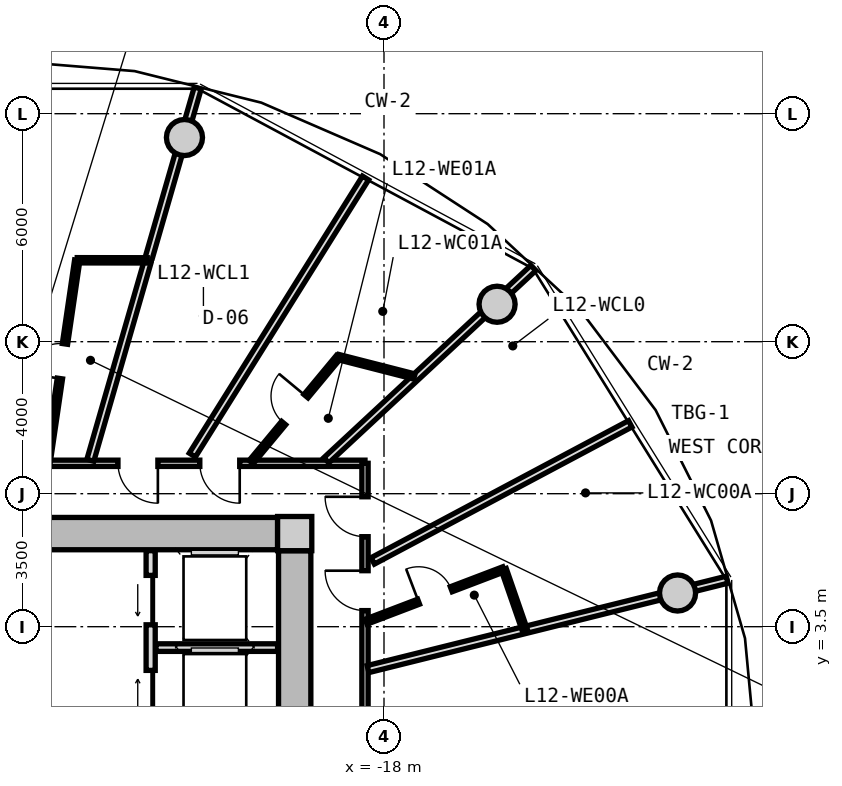
"""IFC4 building model, lengths in metres.
Left out: names, types, materials, properties, quantities, classifications, styles, units other than length and angle.
Written with IfcOpenShell. Run it as: python <this file> out.ifc"""

import sys

from ifc_helpers import new_model, si_unit, direction, frame, frame_2d, origin, origin_2d, place, context, subcontext, project, spatial, rectangle, circle, extrude, source, transform, mapped, element, fill, save


model = new_model("IFC4")
c1 = context("Model", 3, precision=1e-05, world=origin(), true_north=direction((0.0, 1.0)))
c2 = subcontext(c1, "Body", "Model", "MODEL_VIEW")
j1 = project(units=[si_unit("LENGTHUNIT", "METRE"), si_unit("PLANEANGLEUNIT", "RADIAN")], contexts=[c1])
p1 = place(None, origin())
s1 = spatial("IfcSite", under=j1, at=p1, CompositionType="ELEMENT")
p2 = place(p1, origin())
s2 = spatial("IfcBuilding", under=s1, at=p2, CompositionType="ELEMENT")
p3 = place(p2, frame((0.0, 0.0, 42.95)))
s3 = spatial("IfcBuildingStorey", under=s2, at=p3, CompositionType="ELEMENT", Elevation=42.95)
m1 = source(origin(), c2, "Body", "SweptSolid", [
    extrude(rectangle(XDim=0.9, YDim=0.9, at=origin_2d()), origin(), (0.0, 0.0, 1.0), 3.05),
])
p4 = place(p3, frame((-20.35, 5.95, 0.0), z_axis=(0.0, 0.0, 1.0), x_axis=(1.0, 0.0, 0.0)))
e1 = element("IfcColumn", 1, at=p4, inside=s3, PredefinedType="COLUMN", context=c2, shape_type="MappedRepresentation", body=[
    mapped(m1, transform((0.0, 0.0, 0.0), x_axis=(1.0, 0.0, 0.0), y_axis=(0.0, 1.0, 0.0), z_axis=(0.0, 0.0, 1.0), scale=1.0)),
])
m2 = source(origin(), c2, "Body", "SweptSolid", [
    extrude(rectangle(XDim=14.4, YDim=0.85, at=frame_2d((7.2, 0.0))), origin(), (0.0, 0.0, 1.0), 2.79),
])
p5 = place(p3, frame((-35.2, 5.95, 0.0), z_axis=(0.0, 0.0, 1.0), x_axis=(1.0, 0.0, 0.0)))
e2 = element("IfcWall", 2, at=p5, inside=s3, PredefinedType="SHEAR", context=c2, shape_type="MappedRepresentation", body=[
    mapped(m2, transform((0.0, 0.0, 0.0), x_axis=(1.0, 0.0, 0.0), y_axis=(0.0, 1.0, 0.0), z_axis=(0.0, 0.0, 1.0), scale=1.0)),
])
m3 = source(origin(), c2, "Body", "SweptSolid", [
    extrude(rectangle(XDim=11.0, YDim=0.85, at=frame_2d((5.5, 0.0))), origin(), (0.0, 0.0, 1.0), 2.79),
])
p6 = place(p3, frame((-20.35, 5.5, 0.0), z_axis=(0.0, 0.0, 1.0), x_axis=(0.0, -1.0, 0.0)))
e3 = element("IfcWall", 3, at=p6, inside=s3, PredefinedType="SHEAR", context=c2, shape_type="MappedRepresentation", body=[
    mapped(m3, transform((0.0, 0.0, 0.0), x_axis=(1.0, 0.0, 0.0), y_axis=(0.0, 1.0, 0.0), z_axis=(0.0, 0.0, 1.0), scale=1.0)),
])
p7 = place(p6, frame((5.65, 0.0, 0.0)))
e4 = element("IfcOpeningElement", 4, at=p7, cuts=e3, PredefinedType="OPENING", context=c2, shape_type="SweptSolid", body=[
    extrude(rectangle(XDim=1.2, YDim=2.15, at=frame_2d((0.6, 1.075))), frame((0.0, 0.435, 0.0), z_axis=(0.0, -1.0, 0.0), x_axis=(1.0, 0.0, 0.0)), (0.0, 0.0, 1.0), 0.87),
])
m4 = source(origin(), c2, "Body", "SweptSolid", [
    extrude(circle(Radius=0.475, at=origin_2d()), origin(), (0.0, 0.0, 1.0), 3.05),
])
for number, where, z_axis, x_axis in (
    (5, (-10.275, 4.387, 0.0), (0.0, 0.0, 1.0), (1.0, 0.0, 0.0)),
    (6, (-15.025, 11.985, 0.0), (0.0, 0.0, 1.0), (1.0, 0.0, 0.0)),
    (7, (-23.251, 16.373, 0.0), (0.0, 0.0, 1.0), (1.0, 0.0, 0.0)),
):
    element("IfcColumn", number, at=place(p3, frame(where, z_axis=z_axis, x_axis=x_axis)), inside=s3, PredefinedType="COLUMN", context=c2, shape_type="MappedRepresentation", body=[
        mapped(m4, transform((0.0, 0.0, 0.0), x_axis=(1.0, 0.0, 0.0), y_axis=(0.0, 1.0, 0.0), z_axis=(0.0, 0.0, 1.0), scale=1.0)),
    ])
m5 = source(origin(), c2, "Body", "SweptSolid", [
    extrude(rectangle(XDim=5.0, YDim=0.24, at=frame_2d((2.5, 0.0))), origin(), (0.0, 0.0, 1.0), 2.775),
])
p8 = place(p3, frame((-24.14, 0.5, 0.0), z_axis=(0.0, 0.0, 1.0), x_axis=(0.0, 1.0, 0.0)))
e8 = element("IfcWall", 8, at=p8, inside=s3, PredefinedType="PARTITIONING", context=c2, shape_type="MappedRepresentation", body=[
    mapped(m5, transform((0.0, 0.0, 0.0), x_axis=(1.0, 0.0, 0.0), y_axis=(0.0, 1.0, 0.0), z_axis=(0.0, 0.0, 1.0), scale=1.0)),
])
p9 = place(p8, frame((3.05, 0.0, 0.0)))
e9 = element("IfcOpeningElement", 9, at=p9, cuts=e8, PredefinedType="OPENING", context=c2, shape_type="SweptSolid", body=[
    extrude(rectangle(XDim=1.3, YDim=2.2, at=frame_2d((0.65, 1.1))), frame((0.0, 0.13, 0.0), z_axis=(0.0, -1.0, 0.0), x_axis=(1.0, 0.0, 0.0)), (0.0, 0.0, 1.0), 0.26),
])
p10 = place(p8, frame((0.55, 0.0, 0.0)))
e10 = element("IfcOpeningElement", 10, at=p10, cuts=e8, PredefinedType="OPENING", context=c2, shape_type="SweptSolid", body=[
    extrude(rectangle(XDim=1.3, YDim=2.2, at=frame_2d((0.65, 1.1))), frame((0.0, 0.13, 0.0), z_axis=(0.0, -1.0, 0.0), x_axis=(1.0, 0.0, 0.0)), (0.0, 0.0, 1.0), 0.26),
])
m6 = source(origin(), c2, "Body", "SweptSolid", [
    extrude(rectangle(XDim=3.2, YDim=0.2, at=frame_2d((1.6, 0.0))), origin(), (0.0, 0.0, 1.0), 2.775),
])
p11 = place(p3, frame((-24.0, 2.95, 0.0), z_axis=(0.0, 0.0, 1.0), x_axis=(1.0, 0.0, 0.0)))
e11 = element("IfcWall", 11, at=p11, inside=s3, PredefinedType="PARTITIONING", context=c2, shape_type="MappedRepresentation", body=[
    mapped(m6, transform((0.0, 0.0, 0.0), x_axis=(1.0, 0.0, 0.0), y_axis=(0.0, 1.0, 0.0), z_axis=(0.0, 0.0, 1.0), scale=1.0)),
])
m7 = source(origin(), c2, "Body", "SweptSolid", [
    extrude(rectangle(XDim=19.0, YDim=0.165, at=frame_2d((9.5, 0.0))), origin(), (0.0, 0.0, 1.0), 2.775),
])
p12 = place(p3, frame((-37.5, 7.8, 0.0), z_axis=(0.0, 0.0, 1.0), x_axis=(1.0, 0.0, 0.0)))
e12 = element("IfcWall", 12, at=p12, inside=s3, PredefinedType="PARTITIONING", context=c2, shape_type="MappedRepresentation", body=[
    mapped(m7, transform((0.0, 0.0, 0.0), x_axis=(1.0, 0.0, 0.0), y_axis=(0.0, 1.0, 0.0), z_axis=(0.0, 0.0, 1.0), scale=1.0)),
])
p13 = place(p12, frame((4.773, 0.0, 0.0)))
e13 = element("IfcOpeningElement", 13, at=p13, cuts=e12, PredefinedType="OPENING", context=c2, shape_type="SweptSolid", body=[
    extrude(rectangle(XDim=1.05, YDim=2.15, at=frame_2d((0.525, 1.075))), frame((0.0, 0.093, 0.0), z_axis=(0.0, -1.0, 0.0), x_axis=(1.0, 0.0, 0.0)), (0.0, 0.0, 1.0), 0.185),
])
p14 = place(p12, frame((2.251, 0.0, 0.0)))
e14 = element("IfcOpeningElement", 14, at=p14, cuts=e12, PredefinedType="OPENING", context=c2, shape_type="SweptSolid", body=[
    extrude(rectangle(XDim=1.05, YDim=2.15, at=frame_2d((0.525, 1.075))), frame((0.0, 0.093, 0.0), z_axis=(0.0, -1.0, 0.0), x_axis=(1.0, 0.0, 0.0)), (0.0, 0.0, 1.0), 0.185),
])
p15 = place(p12, frame((14.653, 0.0, 0.0)))
e15 = element("IfcOpeningElement", 15, at=p15, cuts=e12, PredefinedType="OPENING", context=c2, shape_type="SweptSolid", body=[
    extrude(rectangle(XDim=1.05, YDim=2.15, at=frame_2d((0.525, 1.075))), frame((0.0, 0.093, 0.0), z_axis=(0.0, -1.0, 0.0), x_axis=(1.0, 0.0, 0.0)), (0.0, 0.0, 1.0), 0.185),
])
p16 = place(p12, frame((12.5, 0.0, 0.0)))
e16 = element("IfcOpeningElement", 16, at=p16, cuts=e12, PredefinedType="OPENING", context=c2, shape_type="SweptSolid", body=[
    extrude(rectangle(XDim=1.05, YDim=2.15, at=frame_2d((0.525, 1.075))), frame((0.0, 0.093, 0.0), z_axis=(0.0, -1.0, 0.0), x_axis=(1.0, 0.0, 0.0)), (0.0, 0.0, 1.0), 0.185),
])
p17 = place(p12, frame((9.352, 0.0, 0.0)))
e17 = element("IfcOpeningElement", 17, at=p17, cuts=e12, PredefinedType="OPENING", context=c2, shape_type="SweptSolid", body=[
    extrude(rectangle(XDim=1.05, YDim=2.15, at=frame_2d((0.525, 1.075))), frame((0.0, 0.093, 0.0), z_axis=(0.0, -1.0, 0.0), x_axis=(1.0, 0.0, 0.0)), (0.0, 0.0, 1.0), 0.185),
])
p18 = place(p12, frame((7.806, 0.0, 0.0)))
e18 = element("IfcOpeningElement", 18, at=p18, cuts=e12, PredefinedType="OPENING", context=c2, shape_type="SweptSolid", body=[
    extrude(rectangle(XDim=1.05, YDim=2.15, at=frame_2d((0.525, 1.075))), frame((0.0, 0.093, 0.0), z_axis=(0.0, -1.0, 0.0), x_axis=(1.0, 0.0, 0.0)), (0.0, 0.0, 1.0), 0.185),
])
m8 = source(origin(), c2, "Body", "SweptSolid", [
    extrude(rectangle(XDim=15.6, YDim=0.165, at=frame_2d((7.8, 0.0))), origin(), (0.0, 0.0, 1.0), 2.775),
])
p19 = place(p3, frame((-18.5, 7.8, 0.0), z_axis=(0.0, 0.0, 1.0), x_axis=(0.0, -1.0, 0.0)))
e19 = element("IfcWall", 19, at=p19, inside=s3, PredefinedType="PARTITIONING", context=c2, shape_type="MappedRepresentation", body=[
    mapped(m8, transform((0.0, 0.0, 0.0), x_axis=(1.0, 0.0, 0.0), y_axis=(0.0, 1.0, 0.0), z_axis=(0.0, 0.0, 1.0), scale=1.0)),
])
p20 = place(p19, frame((12.141, 0.0, 0.0)))
e20 = element("IfcOpeningElement", 20, at=p20, cuts=e19, PredefinedType="OPENING", context=c2, shape_type="SweptSolid", body=[
    extrude(rectangle(XDim=1.25, YDim=2.2, at=frame_2d((0.625, 1.1))), frame((0.0, 0.093, 0.0), z_axis=(0.0, -1.0, 0.0), x_axis=(1.0, 0.0, 0.0)), (0.0, 0.0, 1.0), 0.185),
])
p21 = place(p19, frame((7.175, 0.0, 0.0)))
e21 = element("IfcOpeningElement", 21, at=p21, cuts=e19, PredefinedType="OPENING", context=c2, shape_type="SweptSolid", body=[
    extrude(rectangle(XDim=1.25, YDim=2.2, at=frame_2d((0.625, 1.1))), frame((0.0, 0.093, 0.0), z_axis=(0.0, -1.0, 0.0), x_axis=(1.0, 0.0, 0.0)), (0.0, 0.0, 1.0), 0.185),
])
p22 = place(p19, frame((2.826, 0.0, 0.0)))
e22 = element("IfcOpeningElement", 22, at=p22, cuts=e19, PredefinedType="OPENING", context=c2, shape_type="SweptSolid", body=[
    extrude(rectangle(XDim=1.05, YDim=2.15, at=frame_2d((0.525, 1.075))), frame((0.0, 0.093, 0.0), z_axis=(0.0, -1.0, 0.0), x_axis=(1.0, 0.0, 0.0)), (0.0, 0.0, 1.0), 0.185),
])
p23 = place(p19, frame((0.881, 0.0, 0.0)))
e23 = element("IfcOpeningElement", 23, at=p23, cuts=e19, PredefinedType="OPENING", context=c2, shape_type="SweptSolid", body=[
    extrude(rectangle(XDim=1.05, YDim=2.15, at=frame_2d((0.525, 1.075))), frame((0.0, 0.093, 0.0), z_axis=(0.0, -1.0, 0.0), x_axis=(1.0, 0.0, 0.0)), (0.0, 0.0, 1.0), 0.185),
])
m9 = source(origin(), c2, "Body", "SweptSolid", [
    extrude(rectangle(XDim=9.737, YDim=0.19, at=frame_2d((4.869, 0.0))), origin(), (0.0, 0.0, 1.0), 2.225),
])
p24 = place(p3, frame((-18.42, 2.385, 0.0), z_axis=(0.0, 0.0, 1.0), x_axis=(0.970392716238, 0.241532557375, 0.0)))
e24 = element("IfcWall", 24, at=p24, inside=s3, PredefinedType="PARTITIONING", context=c2, shape_type="MappedRepresentation", body=[
    mapped(m9, transform((0.0, 0.0, 0.0), x_axis=(1.0, 0.0, 0.0), y_axis=(0.0, 1.0, 0.0), z_axis=(0.0, 0.0, 1.0), scale=1.0)),
])
m10 = source(origin(), c2, "Body", "SweptSolid", [
    extrude(rectangle(XDim=7.435, YDim=0.19, at=frame_2d((3.717, 0.0))), origin(), (0.0, 0.0, 1.0), 2.225),
])
p25 = place(p3, frame((-19.517, 7.88, 0.0), z_axis=(0.0, 0.0, 1.0), x_axis=(0.732651956848, 0.680603489652, 0.0)))
e25 = element("IfcWall", 25, at=p25, inside=s3, PredefinedType="PARTITIONING", context=c2, shape_type="MappedRepresentation", body=[
    mapped(m10, transform((0.0, 0.0, 0.0), x_axis=(1.0, 0.0, 0.0), y_axis=(0.0, 1.0, 0.0), z_axis=(0.0, 0.0, 1.0), scale=1.0)),
])
m11 = source(origin(), c2, "Body", "SweptSolid", [
    extrude(rectangle(XDim=7.677, YDim=0.19, at=frame_2d((3.838, 0.0))), origin(), (0.0, 0.0, 1.0), 2.775),
])
p26 = place(p3, frame((-18.297, 5.231, 0.0), z_axis=(0.0, 0.0, 1.0), x_axis=(0.882725057546, 0.469889851753, 0.0)))
e26 = element("IfcWall", 26, at=p26, inside=s3, PredefinedType="PARTITIONING", context=c2, shape_type="MappedRepresentation", body=[
    mapped(m11, transform((0.0, 0.0, 0.0), x_axis=(1.0, 0.0, 0.0), y_axis=(0.0, 1.0, 0.0), z_axis=(0.0, 0.0, 1.0), scale=1.0)),
])
m12 = source(origin(), c2, "Body", "SweptSolid", [
    extrude(rectangle(XDim=3.874, YDim=0.14, at=frame_2d((1.937, 0.0))), origin(), (0.0, 0.0, 1.0), 2.775),
])
p27 = place(p3, frame((-18.47, 3.632, 0.0), z_axis=(0.0, 0.0, 1.0), x_axis=(0.934461775659, 0.35606346321, 0.0)))
e27 = element("IfcWall", 27, at=p27, inside=s3, PredefinedType="PARTITIONING", context=c2, shape_type="MappedRepresentation", body=[
    mapped(m12, transform((0.0, 0.0, 0.0), x_axis=(1.0, 0.0, 0.0), y_axis=(0.0, 1.0, 0.0), z_axis=(0.0, 0.0, 1.0), scale=1.0)),
])
p28 = place(p27, frame((1.477, 0.0, 0.0)))
e28 = element("IfcOpeningElement", 28, at=p28, cuts=e27, PredefinedType="OPENING", context=c2, shape_type="SweptSolid", body=[
    extrude(rectangle(XDim=0.92, YDim=2.1, at=frame_2d((0.46, 1.05))), frame((0.0, 0.08, 0.0), z_axis=(0.0, -1.0, 0.0), x_axis=(1.0, 0.0, 0.0)), (0.0, 0.0, 1.0), 0.16),
])
m13 = source(origin(), c2, "Body", "SweptSolid", [
    extrude(rectangle(XDim=1.676, YDim=0.14, at=frame_2d((0.838, 0.0))), origin(), (0.0, 0.0, 1.0), 2.775),
])
p29 = place(p3, frame((-14.85, 5.011, 0.0), z_axis=(0.0, 0.0, 1.0), x_axis=(0.327785970556, -0.944752008469, 0.0)))
e29 = element("IfcWall", 29, at=p29, inside=s3, PredefinedType="PARTITIONING", context=c2, shape_type="MappedRepresentation", body=[
    mapped(m13, transform((0.0, 0.0, 0.0), x_axis=(1.0, 0.0, 0.0), y_axis=(0.0, 1.0, 0.0), z_axis=(0.0, 0.0, 1.0), scale=1.0)),
])
m14 = source(origin(), c2, "Body", "SweptSolid", [
    extrude(rectangle(XDim=10.196, YDim=0.19, at=frame_2d((5.098, 0.0))), origin(), (0.0, 0.0, 1.0), 2.225),
])
p30 = place(p3, frame((-25.727, 7.88, 0.0), z_axis=(0.0, 0.0, 1.0), x_axis=(0.277136420347, 0.960830580549, 0.0)))
e30 = element("IfcWall", 30, at=p30, inside=s3, PredefinedType="PARTITIONING", context=c2, shape_type="MappedRepresentation", body=[
    mapped(m14, transform((0.0, 0.0, 0.0), x_axis=(1.0, 0.0, 0.0), y_axis=(0.0, 1.0, 0.0), z_axis=(0.0, 0.0, 1.0), scale=1.0)),
])
m15 = source(origin(), c2, "Body", "SweptSolid", [
    extrude(rectangle(XDim=8.598, YDim=0.19, at=frame_2d((4.299, 0.0))), origin(), (0.0, 0.0, 1.0), 2.775),
])
p31 = place(p3, frame((-23.043, 8.017, 0.0), z_axis=(0.0, 0.0, 1.0), x_axis=(0.530039776395, 0.847972779893, 0.0)))
e31 = element("IfcWall", 31, at=p31, inside=s3, PredefinedType="PARTITIONING", context=c2, shape_type="MappedRepresentation", body=[
    mapped(m15, transform((0.0, 0.0, 0.0), x_axis=(1.0, 0.0, 0.0), y_axis=(0.0, 1.0, 0.0), z_axis=(0.0, 0.0, 1.0), scale=1.0)),
])
m16 = source(origin(), c2, "Body", "SweptSolid", [
    extrude(rectangle(XDim=3.594, YDim=0.14, at=frame_2d((1.797, 0.0))), origin(), (0.0, 0.0, 1.0), 2.775),
])
p32 = place(p3, frame((-21.496, 7.83, 0.0), z_axis=(0.0, 0.0, 1.0), x_axis=(0.639001147083, 0.769205781326, 0.0)))
e32 = element("IfcWall", 32, at=p32, inside=s3, PredefinedType="PARTITIONING", context=c2, shape_type="MappedRepresentation", body=[
    mapped(m16, transform((0.0, 0.0, 0.0), x_axis=(1.0, 0.0, 0.0), y_axis=(0.0, 1.0, 0.0), z_axis=(0.0, 0.0, 1.0), scale=1.0)),
])
p33 = place(p32, frame((1.337, 0.0, 0.0)))
e33 = element("IfcOpeningElement", 33, at=p33, cuts=e32, PredefinedType="OPENING", context=c2, shape_type="SweptSolid", body=[
    extrude(rectangle(XDim=0.92, YDim=2.1, at=frame_2d((0.46, 1.05))), frame((0.0, 0.08, 0.0), z_axis=(0.0, -1.0, 0.0), x_axis=(1.0, 0.0, 0.0)), (0.0, 0.0, 1.0), 0.16),
])
m17 = source(origin(), c2, "Body", "SweptSolid", [
    extrude(rectangle(XDim=2.062, YDim=0.14, at=frame_2d((1.031, 0.0))), origin(), (0.0, 0.0, 1.0), 2.415),
])
p34 = place(p3, frame((-19.199, 10.595, 0.0), z_axis=(0.0, 0.0, 1.0), x_axis=(0.968776253543, -0.247936626121, 0.0)))
e34 = element("IfcWall", 34, at=p34, inside=s3, PredefinedType="PARTITIONING", context=c2, shape_type="MappedRepresentation", body=[
    mapped(m17, transform((0.0, 0.0, 0.0), x_axis=(1.0, 0.0, 0.0), y_axis=(0.0, 1.0, 0.0), z_axis=(0.0, 0.0, 1.0), scale=1.0)),
])
m18 = source(origin(), c2, "Body", "SweptSolid", [
    extrude(rectangle(XDim=5.37, YDim=0.14, at=frame_2d((2.685, 0.0))), origin(), (0.0, 0.0, 1.0), 2.775),
])
p35 = place(p3, frame((-26.851, 7.83, 0.0), z_axis=(0.0, 0.0, 1.0), x_axis=(0.145131397853, 0.989412389935, 0.0)))
e35 = element("IfcWall", 35, at=p35, inside=s3, PredefinedType="PARTITIONING", context=c2, shape_type="MappedRepresentation", body=[
    mapped(m18, transform((0.0, 0.0, 0.0), x_axis=(1.0, 0.0, 0.0), y_axis=(0.0, 1.0, 0.0), z_axis=(0.0, 0.0, 1.0), scale=1.0)),
])
p36 = place(p35, frame((2.225, 0.0, 0.0)))
e36 = element("IfcOpeningElement", 36, at=p36, cuts=e35, PredefinedType="OPENING", context=c2, shape_type="SweptSolid", body=[
    extrude(rectangle(XDim=0.92, YDim=2.1, at=frame_2d((0.46, 1.05))), frame((0.0, 0.08, 0.0), z_axis=(0.0, -1.0, 0.0), x_axis=(1.0, 0.0, 0.0)), (0.0, 0.0, 1.0), 0.16),
])
m19 = source(origin(), c2, "Body", "SweptSolid", [
    extrude(rectangle(XDim=1.843, YDim=0.14, at=frame_2d((0.921, 0.0))), origin(), (0.0, 0.0, 1.0), 2.775),
])
p37 = place(p3, frame((-26.072, 13.143, 0.0), z_axis=(0.0, 0.0, 1.0), x_axis=(0.999998937801, -0.001457531246, 0.0)))
e37 = element("IfcWall", 37, at=p37, inside=s3, PredefinedType="PARTITIONING", context=c2, shape_type="MappedRepresentation", body=[
    mapped(m19, transform((0.0, 0.0, 0.0), x_axis=(1.0, 0.0, 0.0), y_axis=(0.0, 1.0, 0.0), z_axis=(0.0, 0.0, 1.0), scale=1.0)),
])
m20 = source(origin(), c2, "Body", "SweptSolid", [
    extrude(rectangle(XDim=1.3, YDim=2.2, at=frame_2d((0.65, 1.1))), frame((0.0, 0.025, 0.0), z_axis=(0.0, -1.0, 0.0), x_axis=(1.0, 0.0, 0.0)), (0.0, 0.0, 1.0), 0.05),
])
p38 = place(p9, origin())
e38 = element("IfcDoor", 38, at=p38, inside=s3, OperationType="SLIDING_TO_LEFT", PredefinedType="DOOR", context=c2, shape_type="MappedRepresentation", body=[
    mapped(m20, transform((0.0, 0.0, 0.0), x_axis=(1.0, 0.0, 0.0), y_axis=(0.0, 1.0, 0.0), z_axis=(0.0, 0.0, 1.0), scale=1.0)),
])
fill(e9, e38)
p39 = place(p10, origin())
e39 = element("IfcDoor", 39, at=p39, inside=s3, OperationType="SLIDING_TO_RIGHT", PredefinedType="DOOR", context=c2, shape_type="MappedRepresentation", body=[
    mapped(m20, transform((0.0, 0.0, 0.0), x_axis=(1.0, 0.0, 0.0), y_axis=(0.0, 1.0, 0.0), z_axis=(0.0, 0.0, 1.0), scale=1.0)),
])
fill(e10, e39)
m21 = source(origin(), c2, "Body", "SweptSolid", [
    extrude(rectangle(XDim=1.05, YDim=2.15, at=frame_2d((0.525, 1.075))), frame((0.0, 0.025, 0.0), z_axis=(0.0, -1.0, 0.0), x_axis=(1.0, 0.0, 0.0)), (0.0, 0.0, 1.0), 0.05),
])
p40 = place(p22, frame((1.05, 0.0, 0.0), z_axis=(0.0, 0.0, 1.0), x_axis=(-1.0, 0.0, 0.0)))
e40 = element("IfcDoor", 40, at=p40, inside=s3, OperationType="SINGLE_SWING_RIGHT", PredefinedType="DOOR", context=c2, shape_type="MappedRepresentation", body=[
    mapped(m21, transform((0.0, 0.0, 0.0), x_axis=(1.0, 0.0, 0.0), y_axis=(0.0, 1.0, 0.0), z_axis=(0.0, 0.0, 1.0), scale=1.0)),
])
fill(e22, e40)
m22 = source(origin(), c2, "Body", "SweptSolid", [
    extrude(rectangle(XDim=0.92, YDim=2.1, at=frame_2d((0.46, 1.05))), frame((0.0, 0.025, 0.0), z_axis=(0.0, -1.0, 0.0), x_axis=(1.0, 0.0, 0.0)), (0.0, 0.0, 1.0), 0.05),
])
p41 = place(p28, origin())
e41 = element("IfcDoor", 41, at=p41, inside=s3, OperationType="SINGLE_SWING_LEFT", PredefinedType="DOOR", context=c2, shape_type="MappedRepresentation", body=[
    mapped(m22, transform((0.0, 0.0, 0.0), x_axis=(1.0, 0.0, 0.0), y_axis=(0.0, 1.0, 0.0), z_axis=(0.0, 0.0, 1.0), scale=1.0)),
])
fill(e28, e41)
p42 = place(p23, frame((1.05, 0.0, 0.0), z_axis=(0.0, 0.0, 1.0), x_axis=(-1.0, 0.0, 0.0)))
e42 = element("IfcDoor", 42, at=p42, inside=s3, OperationType="SINGLE_SWING_RIGHT", PredefinedType="DOOR", context=c2, shape_type="MappedRepresentation", body=[
    mapped(m21, transform((0.0, 0.0, 0.0), x_axis=(1.0, 0.0, 0.0), y_axis=(0.0, 1.0, 0.0), z_axis=(0.0, 0.0, 1.0), scale=1.0)),
])
fill(e23, e42)
p43 = place(p15, frame((1.05, 0.0, 0.0), z_axis=(0.0, 0.0, 1.0), x_axis=(-1.0, 0.0, 0.0)))
e43 = element("IfcDoor", 43, at=p43, inside=s3, OperationType="SINGLE_SWING_LEFT", PredefinedType="DOOR", context=c2, shape_type="MappedRepresentation", body=[
    mapped(m21, transform((0.0, 0.0, 0.0), x_axis=(1.0, 0.0, 0.0), y_axis=(0.0, 1.0, 0.0), z_axis=(0.0, 0.0, 1.0), scale=1.0)),
])
fill(e15, e43)
p44 = place(p33, origin())
e44 = element("IfcDoor", 44, at=p44, inside=s3, OperationType="SINGLE_SWING_RIGHT", PredefinedType="DOOR", context=c2, shape_type="MappedRepresentation", body=[
    mapped(m22, transform((0.0, 0.0, 0.0), x_axis=(1.0, 0.0, 0.0), y_axis=(0.0, 1.0, 0.0), z_axis=(0.0, 0.0, 1.0), scale=1.0)),
])
fill(e33, e44)
p45 = place(p16, frame((1.05, 0.0, 0.0), z_axis=(0.0, 0.0, 1.0), x_axis=(-1.0, 0.0, 0.0)))
e45 = element("IfcDoor", 45, at=p45, inside=s3, OperationType="SINGLE_SWING_LEFT", PredefinedType="DOOR", context=c2, shape_type="MappedRepresentation", body=[
    mapped(m21, transform((0.0, 0.0, 0.0), x_axis=(1.0, 0.0, 0.0), y_axis=(0.0, 1.0, 0.0), z_axis=(0.0, 0.0, 1.0), scale=1.0)),
])
fill(e16, e45)
p46 = place(p36, origin())
e46 = element("IfcDoor", 46, at=p46, inside=s3, OperationType="SINGLE_SWING_LEFT", PredefinedType="DOOR", context=c2, shape_type="MappedRepresentation", body=[
    mapped(m22, transform((0.0, 0.0, 0.0), x_axis=(1.0, 0.0, 0.0), y_axis=(0.0, 1.0, 0.0), z_axis=(0.0, 0.0, 1.0), scale=1.0)),
])
fill(e36, e46)
save(model, sys.argv[1])
